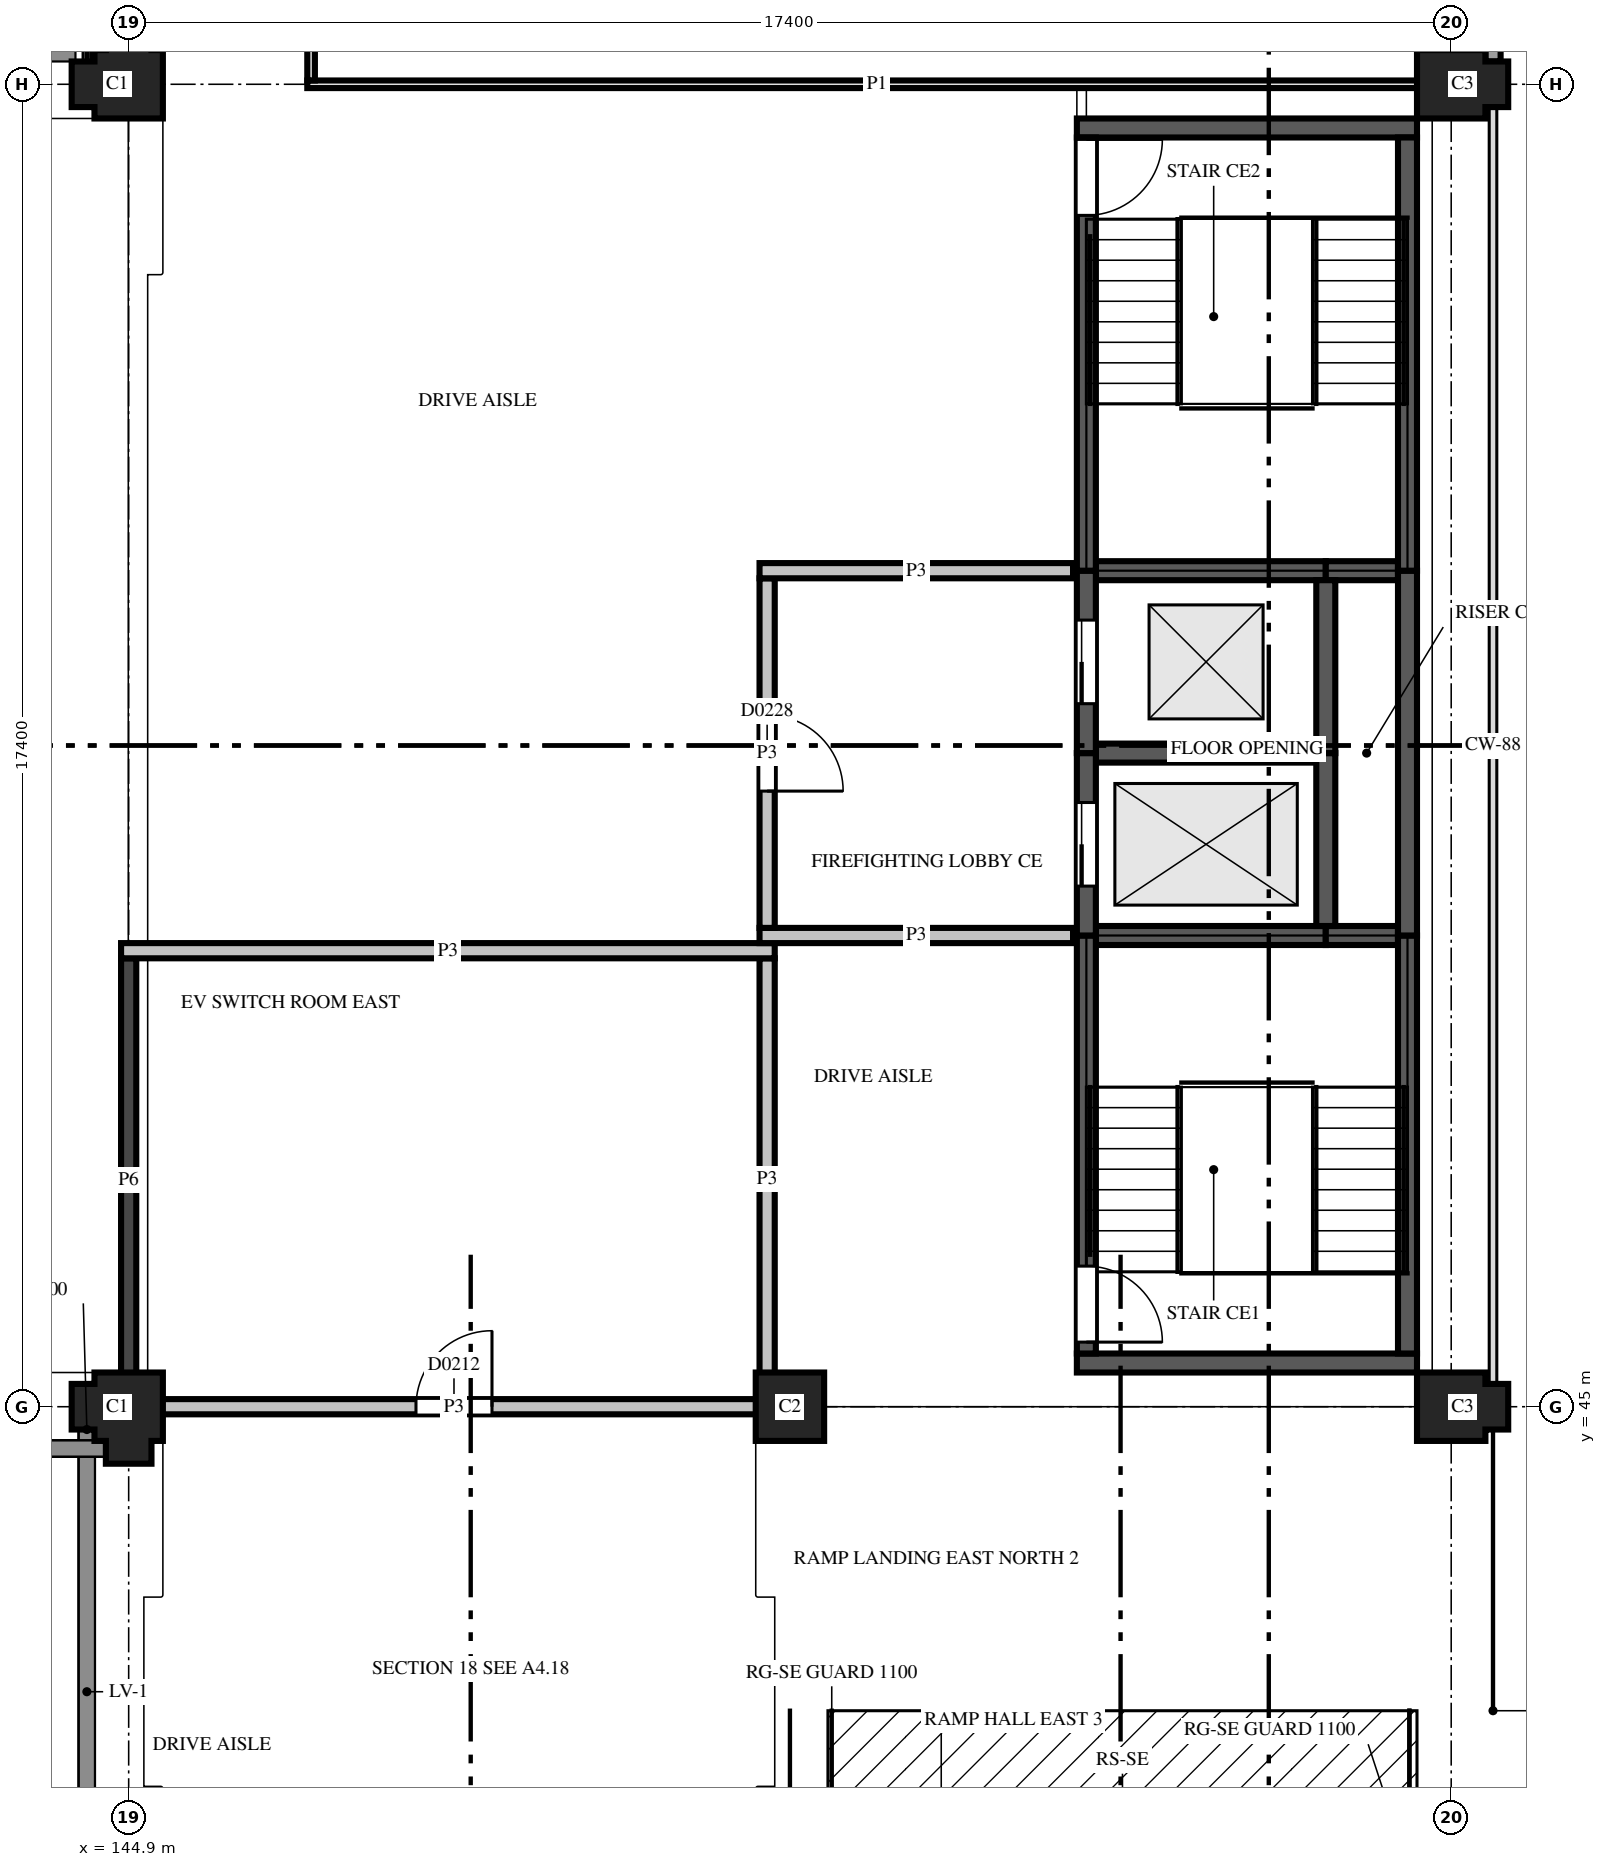
"""IFC4 building model, lengths in metres.
Left out: names, types, materials, properties, quantities, classifications, styles, units other than length and angle.
Written with IfcOpenShell. Run it as: python <this file> out.ifc"""

import sys

from ifc_helpers import new_model, si_unit, direction, frame, frame_2d, origin, place, context, subcontext, project, spatial, polyline, rectangle, outline, extrude, element, fill, save


model = new_model("IFC4")
c1 = context("Model", 3, precision=1e-05, world=origin(), true_north=direction((0.0, 1.0)))
c2 = subcontext(c1, "Body", "Model", "MODEL_VIEW")
j1 = project(units=[si_unit("LENGTHUNIT", "METRE"), si_unit("PLANEANGLEUNIT", "RADIAN")], contexts=[c1])
p1 = place(None, origin())
s1 = spatial("IfcSite", under=j1, at=p1, CompositionType="ELEMENT")
p2 = place(p1, origin())
s2 = spatial("IfcBuilding", under=s1, at=p2, CompositionType="ELEMENT")
p3 = place(p2, frame((0.0, 0.0, 8.2)))
s3 = spatial("IfcBuildingStorey", under=s2, at=p3, CompositionType="ELEMENT", Elevation=8.2)
p4 = place(p3, frame((144.9, 45.0, 0.0), z_axis=(0.0, 0.0, 1.0), x_axis=(-1.0, 0.0, 0.0)))
e1 = element("IfcColumn", 1, at=p4, inside=s3, PredefinedType="COLUMN", context=c2, shape_type="SweptSolid", body=[
    extrude(outline(polyline([(-0.45, -0.45), (0.45, -0.45), (0.45, -0.3), (0.75, -0.3), (0.75, 0.3), (0.45, 0.3), (0.45, 0.45), (0.3, 0.45), (0.3, 0.75), (-0.3, 0.75), (-0.3, 0.45), (-0.45, 0.45), (-0.45, -0.45)])), origin(), (0.0, 0.0, 1.0), 3.7),
])
p5 = place(p3, frame((153.6, 45.0, 0.0), z_axis=(0.0, 0.0, 1.0), x_axis=(1.0, 0.0, 0.0)))
e2 = element("IfcColumn", 2, at=p5, inside=s3, PredefinedType="COLUMN", context=c2, shape_type="SweptSolid", body=[
    extrude(outline(polyline([(-0.45, -0.45), (0.45, -0.45), (0.45, 0.45), (-0.45, 0.45), (-0.45, -0.45)])), origin(), (0.0, 0.0, 1.0), 3.7),
])
p6 = place(p3, frame((162.3, 45.0, 0.0), z_axis=(0.0, 0.0, 1.0), x_axis=(1.0, 0.0, 0.0)))
e3 = element("IfcColumn", 3, at=p6, inside=s3, PredefinedType="COLUMN", context=c2, shape_type="SweptSolid", body=[
    extrude(outline(polyline([(-0.45, -0.45), (0.45, -0.45), (0.45, -0.3), (0.75, -0.3), (0.75, 0.3), (0.45, 0.3), (0.45, 0.45), (-0.45, 0.45), (-0.45, -0.45)])), origin(), (0.0, 0.0, 1.0), 3.7),
])
p7 = place(p3, frame((144.9, 62.4, 0.0), z_axis=(0.0, 0.0, 1.0), x_axis=(0.0, 1.0, 0.0)))
e4 = element("IfcColumn", 4, at=p7, inside=s3, PredefinedType="COLUMN", context=c2, shape_type="SweptSolid", body=[
    extrude(outline(polyline([(-0.45, -0.45), (0.45, -0.45), (0.45, -0.3), (0.75, -0.3), (0.75, 0.3), (0.45, 0.3), (0.45, 0.45), (0.3, 0.45), (0.3, 0.75), (-0.3, 0.75), (-0.3, 0.45), (-0.45, 0.45), (-0.45, -0.45)])), origin(), (0.0, 0.0, 1.0), 3.7),
])
p8 = place(p3, frame((162.3, 62.4, 0.0), z_axis=(0.0, 0.0, 1.0), x_axis=(1.0, 0.0, 0.0)))
e5 = element("IfcColumn", 5, at=p8, inside=s3, PredefinedType="COLUMN", context=c2, shape_type="SweptSolid", body=[
    extrude(outline(polyline([(-0.45, -0.45), (0.45, -0.45), (0.45, -0.3), (0.75, -0.3), (0.75, 0.3), (0.45, 0.3), (0.45, 0.45), (-0.45, 0.45), (-0.45, -0.45)])), origin(), (0.0, 0.0, 1.0), 3.7),
])
p9 = place(p3, frame((157.375, 45.575, 0.0), z_axis=(0.0, 0.0, 1.0), x_axis=(1.0, 0.0, 0.0)))
e6 = element("IfcWall", 6, at=p9, inside=s3, PredefinedType="SHEAR", context=c2, shape_type="SweptSolid", body=[
    extrude(rectangle(XDim=4.475, YDim=0.25, at=frame_2d((2.238, 0.0))), origin(), (0.0, 0.0, 1.0), 3.7),
])
p10 = place(p3, frame((157.625, 51.2, 0.0), z_axis=(0.0, 0.0, 1.0), x_axis=(1.0, 0.0, 0.0)))
e7 = element("IfcWall", 7, at=p10, inside=s3, PredefinedType="SHEAR", context=c2, shape_type="SweptSolid", body=[
    extrude(rectangle(XDim=3.025, YDim=0.25, at=frame_2d((1.512, 0.0))), origin(), (0.0, 0.0, 1.0), 3.7),
])
p11 = place(p3, frame((160.65, 51.2, 0.0), z_axis=(0.0, 0.0, 1.0), x_axis=(1.0, 0.0, 0.0)))
e8 = element("IfcWall", 8, at=p11, inside=s3, PredefinedType="SHEAR", context=c2, shape_type="SweptSolid", body=[
    extrude(rectangle(XDim=0.95, YDim=0.25, at=frame_2d((0.475, 0.0))), origin(), (0.0, 0.0, 1.0), 3.7),
])
p12 = place(p3, frame((157.625, 53.6, 0.0), z_axis=(0.0, 0.0, 1.0), x_axis=(1.0, 0.0, 0.0)))
e9 = element("IfcWall", 9, at=p12, inside=s3, PredefinedType="SHEAR", context=c2, shape_type="SweptSolid", body=[
    extrude(rectangle(XDim=2.9, YDim=0.25, at=frame_2d((1.45, 0.0))), origin(), (0.0, 0.0, 1.0), 3.7),
])
p13 = place(p3, frame((157.625, 56.0, 0.0), z_axis=(0.0, 0.0, 1.0), x_axis=(1.0, 0.0, 0.0)))
e10 = element("IfcWall", 10, at=p13, inside=s3, PredefinedType="SHEAR", context=c2, shape_type="SweptSolid", body=[
    extrude(rectangle(XDim=3.025, YDim=0.25, at=frame_2d((1.512, 0.0))), origin(), (0.0, 0.0, 1.0), 3.7),
])
p14 = place(p3, frame((160.65, 56.0, 0.0), z_axis=(0.0, 0.0, 1.0), x_axis=(1.0, 0.0, 0.0)))
e11 = element("IfcWall", 11, at=p14, inside=s3, PredefinedType="SHEAR", context=c2, shape_type="SweptSolid", body=[
    extrude(rectangle(XDim=0.95, YDim=0.25, at=frame_2d((0.475, 0.0))), origin(), (0.0, 0.0, 1.0), 3.7),
])
p15 = place(p3, frame((157.375, 61.825, 0.0), z_axis=(0.0, 0.0, 1.0), x_axis=(1.0, 0.0, 0.0)))
e12 = element("IfcWall", 12, at=p15, inside=s3, PredefinedType="SHEAR", context=c2, shape_type="SweptSolid", body=[
    extrude(rectangle(XDim=4.475, YDim=0.25, at=frame_2d((2.238, 0.0))), origin(), (0.0, 0.0, 1.0), 3.7),
])
p16 = place(p3, frame((157.5, 45.7, 0.0), z_axis=(0.0, 0.0, 1.0), x_axis=(0.0, 1.0, 0.0)))
e13 = element("IfcWall", 13, at=p16, inside=s3, PredefinedType="SHEAR", context=c2, shape_type="SweptSolid", body=[
    extrude(rectangle(XDim=5.5, YDim=0.25, at=frame_2d((2.75, 0.0))), origin(), (0.0, 0.0, 1.0), 3.7),
])
p17 = place(p16, frame((0.15, 0.0, 0.0)))
e14 = element("IfcOpeningElement", 14, at=p17, cuts=e13, PredefinedType="OPENING", context=c2, shape_type="SweptSolid", body=[
    extrude(rectangle(XDim=1.0, YDim=2.1, at=frame_2d((0.5, 1.05))), frame((0.0, 0.135, 0.0), z_axis=(0.0, -1.0, 0.0), x_axis=(1.0, 0.0, 0.0)), (0.0, 0.0, 1.0), 0.27),
])
p18 = place(p3, frame((157.5, 51.2, 0.0), z_axis=(0.0, 0.0, 1.0), x_axis=(0.0, 1.0, 0.0)))
e15 = element("IfcWall", 15, at=p18, inside=s3, PredefinedType="SHEAR", context=c2, shape_type="SweptSolid", body=[
    extrude(rectangle(XDim=2.4, YDim=0.25, at=frame_2d((1.2, 0.0))), origin(), (0.0, 0.0, 1.0), 3.7),
])
p19 = place(p18, frame((0.65, 0.0, 0.0)))
e16 = element("IfcOpeningElement", 16, at=p19, cuts=e15, PredefinedType="OPENING", context=c2, shape_type="SweptSolid", body=[
    extrude(rectangle(XDim=1.1, YDim=2.1, at=frame_2d((0.55, 1.05))), frame((0.0, 0.135, 0.0), z_axis=(0.0, -1.0, 0.0), x_axis=(1.0, 0.0, 0.0)), (0.0, 0.0, 1.0), 0.27),
])
p20 = place(p3, frame((157.5, 53.6, 0.0), z_axis=(0.0, 0.0, 1.0), x_axis=(0.0, 1.0, 0.0)))
e17 = element("IfcWall", 17, at=p20, inside=s3, PredefinedType="SHEAR", context=c2, shape_type="SweptSolid", body=[
    extrude(rectangle(XDim=2.4, YDim=0.25, at=frame_2d((1.2, 0.0))), origin(), (0.0, 0.0, 1.0), 3.7),
])
p21 = place(p20, frame((0.65, 0.0, 0.0)))
e18 = element("IfcOpeningElement", 18, at=p21, cuts=e17, PredefinedType="OPENING", context=c2, shape_type="SweptSolid", body=[
    extrude(rectangle(XDim=1.1, YDim=2.1, at=frame_2d((0.55, 1.05))), frame((0.0, 0.135, 0.0), z_axis=(0.0, -1.0, 0.0), x_axis=(1.0, 0.0, 0.0)), (0.0, 0.0, 1.0), 0.27),
])
p22 = place(p3, frame((157.5, 56.0, 0.0), z_axis=(0.0, 0.0, 1.0), x_axis=(0.0, 1.0, 0.0)))
e19 = element("IfcWall", 19, at=p22, inside=s3, PredefinedType="SHEAR", context=c2, shape_type="SweptSolid", body=[
    extrude(rectangle(XDim=5.7, YDim=0.25, at=frame_2d((2.85, 0.0))), origin(), (0.0, 0.0, 1.0), 3.7),
])
p23 = place(p22, frame((4.675, 0.0, 0.0)))
e20 = element("IfcOpeningElement", 20, at=p23, cuts=e19, PredefinedType="OPENING", context=c2, shape_type="SweptSolid", body=[
    extrude(rectangle(XDim=1.0, YDim=2.1, at=frame_2d((0.5, 1.05))), frame((0.0, 0.135, 0.0), z_axis=(0.0, -1.0, 0.0), x_axis=(1.0, 0.0, 0.0)), (0.0, 0.0, 1.0), 0.27),
])
p24 = place(p3, frame((160.65, 51.325, 0.0), z_axis=(0.0, 0.0, 1.0), x_axis=(0.0, 1.0, 0.0)))
e21 = element("IfcWall", 21, at=p24, inside=s3, PredefinedType="SHEAR", context=c2, shape_type="SweptSolid", body=[
    extrude(rectangle(XDim=2.275, YDim=0.25, at=frame_2d((1.138, 0.0))), origin(), (0.0, 0.0, 1.0), 3.7),
])
p25 = place(p3, frame((160.65, 53.6, 0.0), z_axis=(0.0, 0.0, 1.0), x_axis=(0.0, 1.0, 0.0)))
e22 = element("IfcWall", 22, at=p25, inside=s3, PredefinedType="SHEAR", context=c2, shape_type="SweptSolid", body=[
    extrude(rectangle(XDim=2.275, YDim=0.25, at=frame_2d((1.137, 0.0))), origin(), (0.0, 0.0, 1.0), 3.7),
])
p26 = place(p3, frame((161.725, 45.7, 0.0), z_axis=(0.0, 0.0, 1.0), x_axis=(0.0, 1.0, 0.0)))
e23 = element("IfcWall", 23, at=p26, inside=s3, PredefinedType="SHEAR", context=c2, shape_type="SweptSolid", body=[
    extrude(rectangle(XDim=5.5, YDim=0.25, at=frame_2d((2.75, 0.0))), origin(), (0.0, 0.0, 1.0), 3.7),
])
p27 = place(p3, frame((161.725, 51.2, 0.0), z_axis=(0.0, 0.0, 1.0), x_axis=(0.0, 1.0, 0.0)))
e24 = element("IfcWall", 24, at=p27, inside=s3, PredefinedType="SHEAR", context=c2, shape_type="SweptSolid", body=[
    extrude(rectangle(XDim=4.8, YDim=0.25, at=frame_2d((2.4, 0.0))), origin(), (0.0, 0.0, 1.0), 3.7),
])
p28 = place(p3, frame((161.725, 56.0, 0.0), z_axis=(0.0, 0.0, 1.0), x_axis=(0.0, 1.0, 0.0)))
e25 = element("IfcWall", 25, at=p28, inside=s3, PredefinedType="SHEAR", context=c2, shape_type="SweptSolid", body=[
    extrude(rectangle(XDim=5.7, YDim=0.25, at=frame_2d((2.85, 0.0))), origin(), (0.0, 0.0, 1.0), 3.7),
])
p29 = place(p3, frame((162.85, 62.7, 0.0), z_axis=(0.0, 0.0, 1.0), x_axis=(0.0, 1.0, 0.0)))
e26 = element("IfcWall", 26, at=p29, inside=s3, PredefinedType="SOLIDWALL", context=c2, shape_type="SweptSolid", body=[
    extrude(rectangle(XDim=6.9, YDim=0.2, at=frame_2d((3.45, 0.0))), origin(), (0.0, 0.0, 1.0), 2.3),
])
p30 = place(p29, frame((2.25, 0.0, 0.55)))
e27 = element("IfcOpeningElement", 27, at=p30, cuts=e26, PredefinedType="OPENING", context=c2, shape_type="SweptSolid", body=[
    extrude(rectangle(XDim=2.4, YDim=1.0, at=frame_2d((1.2, 0.5))), frame((0.0, 0.11, 0.0), z_axis=(0.0, -1.0, 0.0), x_axis=(1.0, 0.0, 0.0)), (0.0, 0.0, 1.0), 0.22),
])
p31 = place(p3, frame((144.96, 45.0, 0.0), z_axis=(0.0, 0.0, 1.0), x_axis=(1.0, 0.0, 0.0)))
e28 = element("IfcWall", 28, at=p31, inside=s3, PredefinedType="PARTITIONING", context=c2, shape_type="SweptSolid", body=[
    extrude(rectangle(XDim=8.44, YDim=0.2, at=frame_2d((4.22, 0.0))), origin(), (0.0, 0.0, 1.0), 2.88),
])
p32 = place(p31, frame((3.72, 0.0, 0.0)))
e29 = element("IfcOpeningElement", 29, at=p32, cuts=e28, PredefinedType="OPENING", context=c2, shape_type="SweptSolid", body=[
    extrude(rectangle(XDim=1.0, YDim=2.1, at=frame_2d((0.5, 1.05))), frame((0.0, 0.11, 0.0), z_axis=(0.0, -1.0, 0.0), x_axis=(1.0, 0.0, 0.0)), (0.0, 0.0, 1.0), 0.22),
])
p33 = place(p3, frame((153.3, 45.1, 0.0), z_axis=(0.0, 0.0, 1.0), x_axis=(0.0, 1.0, 0.0)))
e30 = element("IfcWall", 30, at=p33, inside=s3, PredefinedType="PARTITIONING", context=c2, shape_type="SweptSolid", body=[
    extrude(rectangle(XDim=5.8, YDim=0.2, at=frame_2d((2.9, 0.0))), origin(), (0.0, 0.0, 1.0), 2.88),
])
p34 = place(p3, frame((144.9, 50.9, 0.0), z_axis=(0.0, 0.0, 1.0), x_axis=(0.0, -1.0, 0.0)))
e31 = element("IfcWall", 31, at=p34, inside=s3, PredefinedType="PARTITIONING", context=c2, shape_type="SweptSolid", body=[
    extrude(rectangle(XDim=5.84, YDim=0.2, at=frame_2d((2.92, 0.0))), origin(), (0.0, 0.0, 1.0), 2.2),
])
p35 = place(p3, frame((153.4, 51.0, 0.0), z_axis=(0.0, 0.0, 1.0), x_axis=(-1.0, 0.0, 0.0)))
e32 = element("IfcWall", 32, at=p35, inside=s3, PredefinedType="PARTITIONING", context=c2, shape_type="SweptSolid", body=[
    extrude(rectangle(XDim=8.6, YDim=0.2, at=frame_2d((4.3, 0.0))), origin(), (0.0, 0.0, 1.0), 2.88),
])
p36 = place(p3, frame((153.2, 51.2, 0.0), z_axis=(0.0, 0.0, 1.0), x_axis=(1.0, 0.0, 0.0)))
e33 = element("IfcWall", 33, at=p36, inside=s3, PredefinedType="PARTITIONING", context=c2, shape_type="SweptSolid", body=[
    extrude(rectangle(XDim=4.125, YDim=0.2, at=frame_2d((2.062, 0.0))), origin(), (0.0, 0.0, 1.0), 2.88),
])
p37 = place(p3, frame((153.3, 55.9, 0.0), z_axis=(0.0, 0.0, 1.0), x_axis=(0.0, -1.0, 0.0)))
e34 = element("IfcWall", 34, at=p37, inside=s3, PredefinedType="PARTITIONING", context=c2, shape_type="SweptSolid", body=[
    extrude(rectangle(XDim=4.6, YDim=0.2, at=frame_2d((2.3, 0.0))), origin(), (0.0, 0.0, 1.0), 2.88),
])
p38 = place(p37, frame((1.8, 0.0, 0.0)))
e35 = element("IfcOpeningElement", 35, at=p38, cuts=e34, PredefinedType="OPENING", context=c2, shape_type="SweptSolid", body=[
    extrude(rectangle(XDim=1.0, YDim=2.1, at=frame_2d((0.5, 1.05))), frame((0.0, 0.11, 0.0), z_axis=(0.0, -1.0, 0.0), x_axis=(1.0, 0.0, 0.0)), (0.0, 0.0, 1.0), 0.22),
])
p39 = place(p3, frame((157.325, 56.0, 0.0), z_axis=(0.0, 0.0, 1.0), x_axis=(-1.0, 0.0, 0.0)))
e36 = element("IfcWall", 36, at=p39, inside=s3, PredefinedType="PARTITIONING", context=c2, shape_type="SweptSolid", body=[
    extrude(rectangle(XDim=4.125, YDim=0.2, at=frame_2d((2.062, 0.0))), origin(), (0.0, 0.0, 1.0), 2.88),
])
p40 = place(p3, frame((147.25, 62.4, 0.0), z_axis=(0.0, 0.0, 1.0), x_axis=(1.0, 0.0, 0.0)))
e37 = element("IfcWall", 37, at=p40, inside=s3, PredefinedType="PARTITIONING", context=c2, shape_type="SweptSolid", body=[
    extrude(rectangle(XDim=14.99, YDim=0.1, at=frame_2d((7.495, 0.0))), origin(), (0.0, 0.0, 1.0), 2.88),
])
p41 = place(p3, frame((147.3, 84.85, 0.0), z_axis=(0.0, 0.0, 1.0), x_axis=(0.0, -1.0, 0.0)))
e38 = element("IfcWall", 38, at=p41, inside=s3, PredefinedType="PARTITIONING", context=c2, shape_type="SweptSolid", body=[
    extrude(rectangle(XDim=22.4, YDim=0.1, at=frame_2d((11.2, 0.0))), origin(), (0.0, 0.0, 1.0), 2.88),
])
p42 = place(p41, frame((10.75, 0.0, 0.0)))
e39 = element("IfcOpeningElement", 39, at=p42, cuts=e38, PredefinedType="OPENING", context=c2, shape_type="SweptSolid", body=[
    extrude(rectangle(XDim=0.9, YDim=2.1, at=frame_2d((0.45, 1.05))), frame((0.0, 0.06, 0.0), z_axis=(0.0, -1.0, 0.0), x_axis=(1.0, 0.0, 0.0)), (0.0, 0.0, 1.0), 0.12),
])
p43 = place(p32, origin())
e40 = element("IfcDoor", 40, at=p43, inside=s3, OperationType="SINGLE_SWING_LEFT", PredefinedType="DOOR", context=c2, shape_type="SweptSolid", body=[
    extrude(rectangle(XDim=1.0, YDim=2.1, at=frame_2d((0.5, 1.05))), frame((0.0, 0.025, 0.0), z_axis=(0.0, -1.0, 0.0), x_axis=(1.0, 0.0, 0.0)), (0.0, 0.0, 1.0), 0.05),
])
fill(e29, e40)
p44 = place(p38, origin())
e41 = element("IfcDoor", 41, at=p44, inside=s3, OperationType="SINGLE_SWING_LEFT", PredefinedType="DOOR", context=c2, shape_type="SweptSolid", body=[
    extrude(rectangle(XDim=1.0, YDim=2.1, at=frame_2d((0.5, 1.05))), frame((0.0, 0.025, 0.0), z_axis=(0.0, -1.0, 0.0), x_axis=(1.0, 0.0, 0.0)), (0.0, 0.0, 1.0), 0.05),
])
fill(e35, e41)
p45 = place(p19, origin())
e42 = element("IfcDoor", 42, at=p45, inside=s3, OperationType="SLIDING_TO_LEFT", PredefinedType="DOOR", context=c2, shape_type="SweptSolid", body=[
    extrude(rectangle(XDim=1.1, YDim=2.1, at=frame_2d((0.55, 1.05))), frame((0.0, 0.025, 0.0), z_axis=(0.0, -1.0, 0.0), x_axis=(1.0, 0.0, 0.0)), (0.0, 0.0, 1.0), 0.05),
])
fill(e16, e42)
p46 = place(p21, origin())
e43 = element("IfcDoor", 43, at=p46, inside=s3, OperationType="SLIDING_TO_LEFT", PredefinedType="DOOR", context=c2, shape_type="SweptSolid", body=[
    extrude(rectangle(XDim=1.1, YDim=2.1, at=frame_2d((0.55, 1.05))), frame((0.0, 0.025, 0.0), z_axis=(0.0, -1.0, 0.0), x_axis=(1.0, 0.0, 0.0)), (0.0, 0.0, 1.0), 0.05),
])
fill(e18, e43)
p47 = place(p23, origin())
e44 = element("IfcDoor", 44, at=p47, inside=s3, OperationType="SINGLE_SWING_RIGHT", PredefinedType="DOOR", context=c2, shape_type="SweptSolid", body=[
    extrude(rectangle(XDim=1.0, YDim=2.1, at=frame_2d((0.5, 1.05))), frame((0.0, 0.025, 0.0), z_axis=(0.0, -1.0, 0.0), x_axis=(1.0, 0.0, 0.0)), (0.0, 0.0, 1.0), 0.05),
])
fill(e20, e44)
p48 = place(p17, origin())
e45 = element("IfcDoor", 45, at=p48, inside=s3, OperationType="SINGLE_SWING_LEFT", PredefinedType="DOOR", context=c2, shape_type="SweptSolid", body=[
    extrude(rectangle(XDim=1.0, YDim=2.1, at=frame_2d((0.5, 1.05))), frame((0.0, 0.025, 0.0), z_axis=(0.0, -1.0, 0.0), x_axis=(1.0, 0.0, 0.0)), (0.0, 0.0, 1.0), 0.05),
])
fill(e14, e45)
save(model, sys.argv[1])
